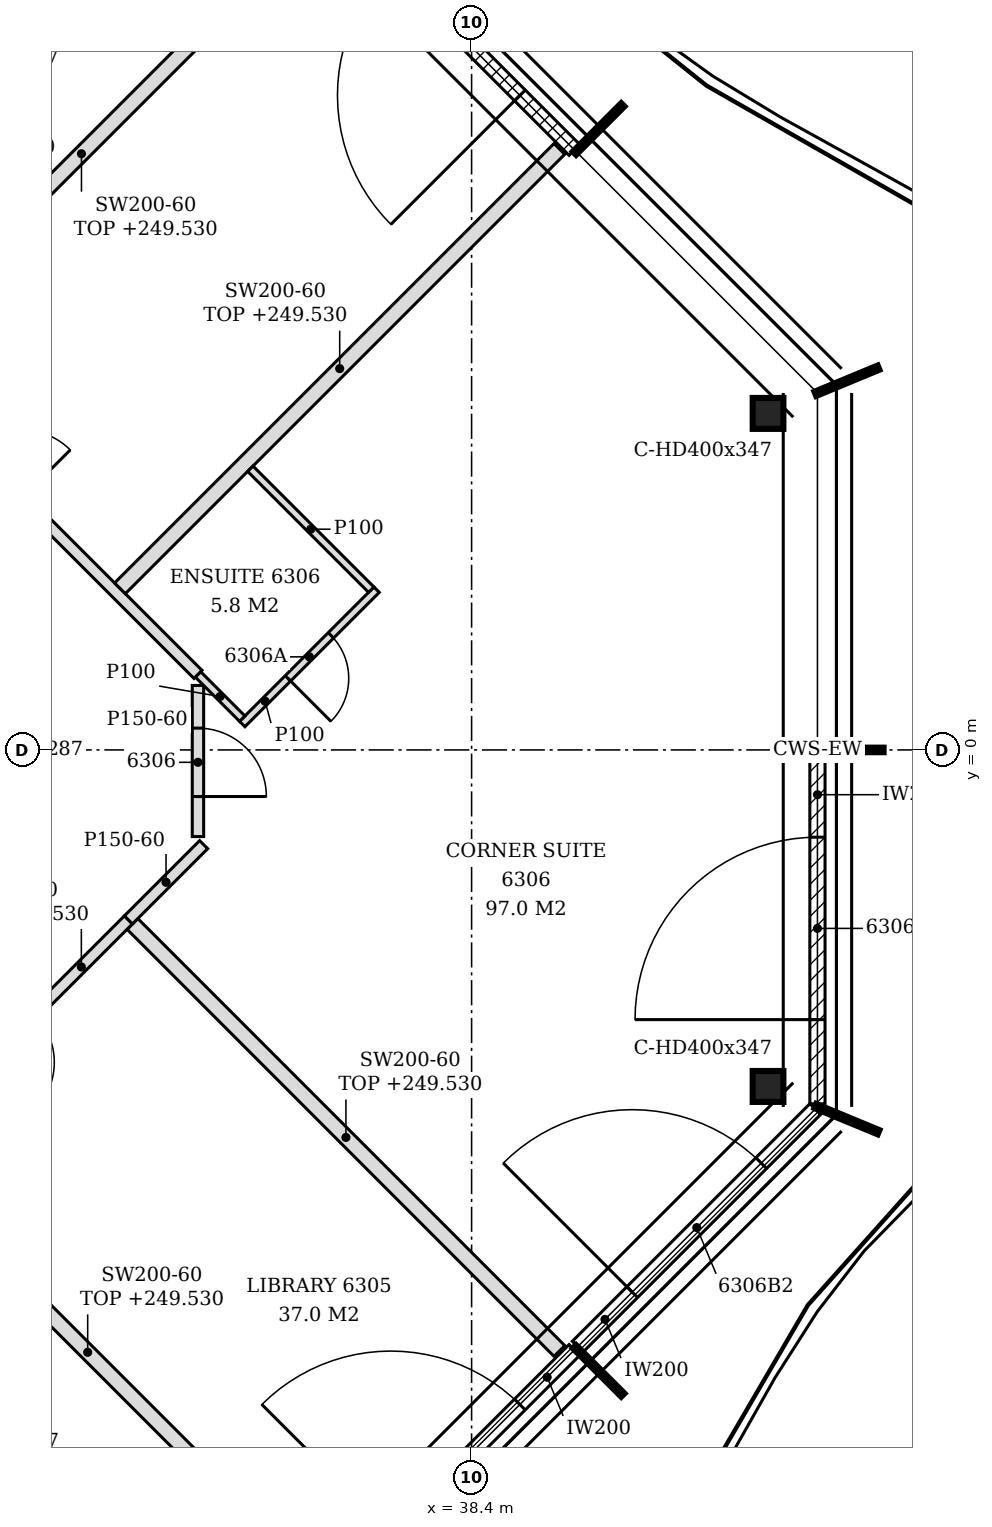
"""IFC4 building model, lengths in metres.
Left out: names, types, materials, properties, quantities, classifications, styles, units other than length and angle.
Written with IfcOpenShell. Run it as: python <this file> out.ifc"""

import sys

from ifc_helpers import new_model, si_unit, direction, frame, frame_2d, origin, origin_2d, place, context, subcontext, project, spatial, polyline, rectangle, i_section, outline, extrude, element, fill, save


model = new_model("IFC4")
c1 = context("Model", 3, precision=1e-05, world=origin(), true_north=direction((0.0, 1.0)))
c2 = subcontext(c1, "Body", "Model", "MODEL_VIEW")
j1 = project(units=[si_unit("LENGTHUNIT", "METRE"), si_unit("PLANEANGLEUNIT", "RADIAN")], contexts=[c1])
p1 = place(None, origin())
s1 = spatial("IfcSite", under=j1, at=p1, CompositionType="ELEMENT")
p2 = place(p1, origin())
s2 = spatial("IfcBuilding", under=s1, at=p2, CompositionType="ELEMENT")
p3 = place(p2, frame((0.0, 0.0, 246.6)))
s3 = spatial("IfcBuildingStorey", under=s2, at=p3, CompositionType="ELEMENT", Elevation=246.6)
for number, where, z_axis, x_axis in (
    (1, (42.3, -4.427, -0.15), (0.0, 0.0, 1.0), (1.0, 0.0, 0.0)),
    (2, (42.3, 4.427, -0.15), (0.0, 0.0, 1.0), (1.0, 0.0, 0.0)),
):
    element("IfcColumn", number, at=place(p3, frame(where, z_axis=z_axis, x_axis=x_axis)), inside=s3, PredefinedType="COLUMN", context=c2, shape_type="SweptSolid", body=[
        extrude(i_section(OverallWidth=0.404, OverallDepth=0.407, WebThickness=0.027, FlangeThickness=0.044, FilletRadius=0.015, at=origin_2d()), origin(), (0.0, 0.0, 1.0), 3.6),
    ])
p4 = place(p3, frame((36.62, -11.026, 0.0), z_axis=(0.0, 0.0, 1.0), x_axis=(0.707106781187, 0.707106781187, 0.0)))
e3 = element("IfcWall", 3, at=p4, inside=s3, PredefinedType="NOTDEFINED", context=c2, shape_type="SweptSolid", body=[
    extrude(rectangle(XDim=4.431, YDim=0.2, at=frame_2d((2.215, 0.0))), origin(), (0.0, 0.0, 1.0), 3.45),
])
p5 = place(p4, frame((1.015, 0.0, 0.0)))
e4 = element("IfcOpeningElement", 4, at=p5, cuts=e3, PredefinedType="OPENING", context=c2, shape_type="SweptSolid", body=[
    extrude(rectangle(XDim=2.4, YDim=2.4, at=frame_2d((1.2, 1.2))), frame((0.0, 0.11, 0.0), z_axis=(0.0, -1.0, 0.0), x_axis=(1.0, 0.0, 0.0)), (0.0, 0.0, 1.0), 0.22),
])
p6 = place(p3, frame((39.796, -7.851, 0.0), z_axis=(0.0, 0.0, 1.0), x_axis=(0.707079168996, 0.707134392299, 0.0)))
e5 = element("IfcWall", 5, at=p6, inside=s3, PredefinedType="NOTDEFINED", context=c2, shape_type="SweptSolid", body=[
    extrude(rectangle(XDim=4.421, YDim=0.2, at=frame_2d((2.21, 0.0))), origin(), (0.0, 0.0, 1.0), 3.45),
])
p7 = place(p6, frame((1.016, 0.0, 0.0)))
e6 = element("IfcOpeningElement", 6, at=p7, cuts=e5, PredefinedType="OPENING", context=c2, shape_type="SweptSolid", body=[
    extrude(rectangle(XDim=2.4, YDim=2.4, at=frame_2d((1.2, 1.2))), frame((0.0, 0.11, 0.0), z_axis=(0.0, -1.0, 0.0), x_axis=(1.0, 0.0, 0.0)), (0.0, 0.0, 1.0), 0.22),
])
p8 = place(p3, frame((42.95, -4.656, 0.0), z_axis=(0.0, 0.0, 1.0), x_axis=(0.0, 1.0, 0.0)))
e7 = element("IfcWall", 7, at=p8, inside=s3, PredefinedType="NOTDEFINED", context=c2, shape_type="SweptSolid", body=[
    extrude(rectangle(XDim=4.626, YDim=0.2, at=frame_2d((2.313, 0.0))), origin(), (0.0, 0.0, 1.0), 3.45),
])
p9 = place(p8, frame((1.108, 0.0, 0.0)))
e8 = element("IfcOpeningElement", 8, at=p9, cuts=e7, PredefinedType="OPENING", context=c2, shape_type="SweptSolid", body=[
    extrude(rectangle(XDim=2.4, YDim=2.4, at=frame_2d((1.2, 1.2))), frame((0.0, 0.11, 0.0), z_axis=(0.0, -1.0, 0.0), x_axis=(1.0, 0.0, 0.0)), (0.0, 0.0, 1.0), 0.22),
])
p10 = place(p3, frame((39.753, 7.893, 0.0), z_axis=(0.0, 0.0, 1.0), x_axis=(-0.707106781187, 0.707106781187, 0.0)))
e9 = element("IfcWall", 9, at=p10, inside=s3, PredefinedType="NOTDEFINED", context=c2, shape_type="SweptSolid", body=[
    extrude(rectangle(XDim=4.431, YDim=0.2, at=frame_2d((2.215, 0.0))), origin(), (0.0, 0.0, 1.0), 3.45),
])
p11 = place(p10, frame((1.015, 0.0, 0.0)))
e10 = element("IfcOpeningElement", 10, at=p11, cuts=e9, PredefinedType="OPENING", context=c2, shape_type="SweptSolid", body=[
    extrude(rectangle(XDim=2.4, YDim=2.4, at=frame_2d((1.2, 1.2))), frame((0.0, 0.11, 0.0), z_axis=(0.0, -1.0, 0.0), x_axis=(1.0, 0.0, 0.0)), (0.0, 0.0, 1.0), 0.22),
])
p12 = place(p3, frame((35.873, -10.449, 0.0), z_axis=(0.0, 0.0, 1.0), x_axis=(-0.707089680867, 0.707123881093, 0.0)))
e11 = element("IfcWall", 11, at=p12, inside=s3, PredefinedType="PARTITIONING", context=c2, shape_type="SweptSolid", body=[
    extrude(rectangle(XDim=7.139, YDim=0.2, at=frame_2d((3.569, 0.0))), origin(), (0.0, 0.0, 1.0), 2.93),
])
p13 = place(p3, frame((39.555, -7.907, 0.0), z_axis=(0.0, 0.0, 1.0), x_axis=(-0.707060685068, 0.7071528743, 0.0)))
e12 = element("IfcWall", 12, at=p13, inside=s3, PredefinedType="PARTITIONING", context=c2, shape_type="SweptSolid", body=[
    extrude(rectangle(XDim=7.945, YDim=0.2, at=frame_2d((3.972, 0.0))), origin(), (0.0, 0.0, 1.0), 2.93),
])
p14 = place(p3, frame((30.772, -5.348, 0.0), z_axis=(0.0, 0.0, 1.0), x_axis=(0.70724543229, 0.706968102891, 0.0)))
e13 = element("IfcWall", 13, at=p14, inside=s3, PredefinedType="PARTITIONING", context=c2, shape_type="SweptSolid", body=[
    extrude(rectangle(XDim=4.402, YDim=0.15, at=frame_2d((2.201, 0.0))), origin(), (0.0, 0.0, 1.0), 2.93),
])
p15 = place(p14, frame((1.751, 0.0, 0.0)))
e14 = element("IfcOpeningElement", 14, at=p15, cuts=e13, PredefinedType="OPENING", context=c2, shape_type="SweptSolid", body=[
    extrude(rectangle(XDim=0.9, YDim=2.1, at=frame_2d((0.45, 1.05))), frame((0.0, 0.085, 0.0), z_axis=(0.0, -1.0, 0.0), x_axis=(1.0, 0.0, 0.0)), (0.0, 0.0, 1.0), 0.17),
])
p16 = place(p3, frame((33.885, -2.236, 0.0), z_axis=(0.0, 0.0, 1.0), x_axis=(0.707106781187, 0.707106781187, 0.0)))
e15 = element("IfcWall", 15, at=p16, inside=s3, PredefinedType="PARTITIONING", context=c2, shape_type="SweptSolid", body=[
    extrude(rectangle(XDim=1.4, YDim=0.15, at=frame_2d((0.7, 0.0))), origin(), (0.0, 0.0, 1.0), 3.45),
])
p17 = place(p3, frame((34.8, -1.14, 0.0), z_axis=(0.0, 0.0, 1.0), x_axis=(0.0, 1.0, 0.0)))
e16 = element("IfcWall", 16, at=p17, inside=s3, PredefinedType="PARTITIONING", context=c2, shape_type="SweptSolid", body=[
    extrude(outline(polyline([(0.0, 0.0), (1.988, 0.0), (1.988, 3.45), (1.245, 3.45), (1.243, 2.88), (1.035, 2.88), (1.033, 3.45), (0.0, 3.45), (0.0, 0.0)])), frame((0.0, 0.075, 0.0), z_axis=(0.0, -1.0, 0.0), x_axis=(1.0, 0.0, 0.0)), (0.0, 0.0, 1.0), 0.15),
])
p18 = place(p17, frame((0.527, 0.0, 0.0)))
e17 = element("IfcOpeningElement", 17, at=p18, cuts=e16, PredefinedType="OPENING", context=c2, shape_type="SweptSolid", body=[
    extrude(rectangle(XDim=0.9, YDim=2.1, at=frame_2d((0.45, 1.05))), frame((0.0, 0.085, 0.0), z_axis=(0.0, -1.0, 0.0), x_axis=(1.0, 0.0, 0.0)), (0.0, 0.0, 1.0), 0.17),
])
p19 = place(p3, frame((35.383, 0.341, 0.0), z_axis=(0.0, 0.0, 1.0), x_axis=(0.707106781187, 0.707106781187, 0.0)))
e18 = element("IfcWall", 18, at=p19, inside=s3, PredefinedType="PARTITIONING", context=c2, shape_type="SweptSolid", body=[
    extrude(rectangle(XDim=2.5, YDim=0.1, at=frame_2d((1.25, 0.0))), origin(), (0.0, 0.0, 1.0), 3.45),
])
p20 = place(p19, frame((0.85, 0.0, 0.0)))
e19 = element("IfcOpeningElement", 19, at=p20, cuts=e18, PredefinedType="OPENING", context=c2, shape_type="SweptSolid", body=[
    extrude(rectangle(XDim=0.8, YDim=2.1, at=frame_2d((0.4, 1.05))), frame((0.0, 0.06, 0.0), z_axis=(0.0, -1.0, 0.0), x_axis=(1.0, 0.0, 0.0)), (0.0, 0.0, 1.0), 0.12),
])
p21 = place(p3, frame((35.383, 0.411, 0.0), z_axis=(0.0, 0.0, 1.0), x_axis=(-0.707106781187, 0.707106781187, 0.0)))
e20 = element("IfcWall", 20, at=p21, inside=s3, PredefinedType="PARTITIONING", context=c2, shape_type="SweptSolid", body=[
    extrude(rectangle(XDim=0.824, YDim=0.1, at=frame_2d((0.412, 0.0))), origin(), (0.0, 0.0, 1.0), 3.45),
])
p22 = place(p3, frame((34.8, 0.994, 0.0), z_axis=(0.0, 0.0, 1.0), x_axis=(-0.707099634543, 0.707113927758, 0.0)))
e21 = element("IfcWall", 21, at=p22, inside=s3, PredefinedType="PARTITIONING", context=c2, shape_type="SweptSolid", body=[
    extrude(rectangle(XDim=17.081, YDim=0.15, at=frame_2d((8.541, 0.0))), origin(), (0.0, 0.0, 1.0), 2.88),
])
p23 = place(p22, frame((3.276, 0.0, 0.0)))
e22 = element("IfcOpeningElement", 22, at=p23, cuts=e21, PredefinedType="OPENING", context=c2, shape_type="SweptSolid", body=[
    extrude(rectangle(XDim=0.9, YDim=2.1, at=frame_2d((0.45, 1.05))), frame((0.0, 0.085, 0.0), z_axis=(0.0, -1.0, 0.0), x_axis=(1.0, 0.0, 0.0)), (0.0, 0.0, 1.0), 0.17),
])
p24 = place(p22, frame((6.829, 0.0, 0.0)))
e23 = element("IfcOpeningElement", 23, at=p24, cuts=e21, PredefinedType="OPENING", context=c2, shape_type="SweptSolid", body=[
    extrude(rectangle(XDim=0.9, YDim=2.1, at=frame_2d((0.45, 1.05))), frame((0.0, 0.085, 0.0), z_axis=(0.0, -1.0, 0.0), x_axis=(1.0, 0.0, 0.0)), (0.0, 0.0, 1.0), 0.17),
])
p25 = place(p22, frame((11.23, 0.0, 0.0)))
e24 = element("IfcOpeningElement", 24, at=p25, cuts=e21, PredefinedType="OPENING", context=c2, shape_type="SweptSolid", body=[
    extrude(rectangle(XDim=0.9, YDim=2.1, at=frame_2d((0.45, 1.05))), frame((0.0, 0.085, 0.0), z_axis=(0.0, -1.0, 0.0), x_axis=(1.0, 0.0, 0.0)), (0.0, 0.0, 1.0), 0.17),
])
p26 = place(p3, frame((33.774, 2.126, 0.0), z_axis=(0.0, 0.0, 1.0), x_axis=(0.707121711178, 0.70709185088, 0.0)))
e25 = element("IfcWall", 25, at=p26, inside=s3, PredefinedType="PARTITIONING", context=c2, shape_type="SweptSolid", body=[
    extrude(rectangle(XDim=8.176, YDim=0.2, at=frame_2d((4.088, 0.0))), origin(), (0.0, 0.0, 1.0), 2.93),
])
p27 = place(p3, frame((37.08, 2.108, 0.0), z_axis=(0.0, 0.0, 1.0), x_axis=(-0.707106781187, 0.707106781187, 0.0)))
e26 = element("IfcWall", 26, at=p27, inside=s3, PredefinedType="PARTITIONING", context=c2, shape_type="SweptSolid", body=[
    extrude(rectangle(XDim=2.25, YDim=0.1, at=frame_2d((1.125, 0.0))), origin(), (0.0, 0.0, 1.0), 3.45),
])
p28 = place(p3, frame((30.662, 5.238, 0.0), z_axis=(0.0, 0.0, 1.0), x_axis=(0.707106781187, 0.707106781187, 0.0)))
e27 = element("IfcWall", 27, at=p28, inside=s3, PredefinedType="PARTITIONING", context=c2, shape_type="SweptSolid", body=[
    extrude(rectangle(XDim=7.369, YDim=0.2, at=frame_2d((3.685, 0.0))), origin(), (0.0, 0.0, 1.0), 2.93),
])
p29 = place(p5, origin())
e28 = element("IfcDoor", 28, at=p29, inside=s3, OperationType="SINGLE_SWING_LEFT", PredefinedType="DOOR", context=c2, shape_type="SweptSolid", body=[
    extrude(rectangle(XDim=2.4, YDim=2.4, at=frame_2d((1.2, 1.2))), frame((0.0, 0.025, 0.0), z_axis=(0.0, -1.0, 0.0), x_axis=(1.0, 0.0, 0.0)), (0.0, 0.0, 1.0), 0.05),
])
fill(e4, e28)
p30 = place(p7, origin())
e29 = element("IfcDoor", 29, at=p30, inside=s3, OperationType="SINGLE_SWING_LEFT", PredefinedType="DOOR", context=c2, shape_type="SweptSolid", body=[
    extrude(rectangle(XDim=2.4, YDim=2.4, at=frame_2d((1.2, 1.2))), frame((0.0, 0.025, 0.0), z_axis=(0.0, -1.0, 0.0), x_axis=(1.0, 0.0, 0.0)), (0.0, 0.0, 1.0), 0.05),
])
fill(e6, e29)
p31 = place(p9, origin())
e30 = element("IfcDoor", 30, at=p31, inside=s3, OperationType="SINGLE_SWING_LEFT", PredefinedType="DOOR", context=c2, shape_type="SweptSolid", body=[
    extrude(rectangle(XDim=2.4, YDim=2.4, at=frame_2d((1.2, 1.2))), frame((0.0, 0.025, 0.0), z_axis=(0.0, -1.0, 0.0), x_axis=(1.0, 0.0, 0.0)), (0.0, 0.0, 1.0), 0.05),
])
fill(e8, e30)
p32 = place(p11, origin())
e31 = element("IfcDoor", 31, at=p32, inside=s3, OperationType="SINGLE_SWING_LEFT", PredefinedType="DOOR", context=c2, shape_type="SweptSolid", body=[
    extrude(rectangle(XDim=2.4, YDim=2.4, at=frame_2d((1.2, 1.2))), frame((0.0, 0.025, 0.0), z_axis=(0.0, -1.0, 0.0), x_axis=(1.0, 0.0, 0.0)), (0.0, 0.0, 1.0), 0.05),
])
fill(e10, e31)
p33 = place(p18, frame((0.9, 0.0, 0.0), z_axis=(0.0, 0.0, 1.0), x_axis=(-1.0, 0.0, 0.0)))
e32 = element("IfcDoor", 32, at=p33, inside=s3, OperationType="SINGLE_SWING_RIGHT", PredefinedType="DOOR", context=c2, shape_type="SweptSolid", body=[
    extrude(rectangle(XDim=0.9, YDim=2.1, at=frame_2d((0.45, 1.05))), frame((0.0, 0.025, 0.0), z_axis=(0.0, -1.0, 0.0), x_axis=(1.0, 0.0, 0.0)), (0.0, 0.0, 1.0), 0.05),
])
fill(e17, e32)
p34 = place(p20, frame((0.8, 0.0, 0.0), z_axis=(0.0, 0.0, 1.0), x_axis=(-1.0, 0.0, 0.0)))
e33 = element("IfcDoor", 33, at=p34, inside=s3, OperationType="SINGLE_SWING_RIGHT", PredefinedType="DOOR", context=c2, shape_type="SweptSolid", body=[
    extrude(rectangle(XDim=0.8, YDim=2.1, at=frame_2d((0.4, 1.05))), frame((0.0, 0.025, 0.0), z_axis=(0.0, -1.0, 0.0), x_axis=(1.0, 0.0, 0.0)), (0.0, 0.0, 1.0), 0.05),
])
fill(e19, e33)
save(model, sys.argv[1])
